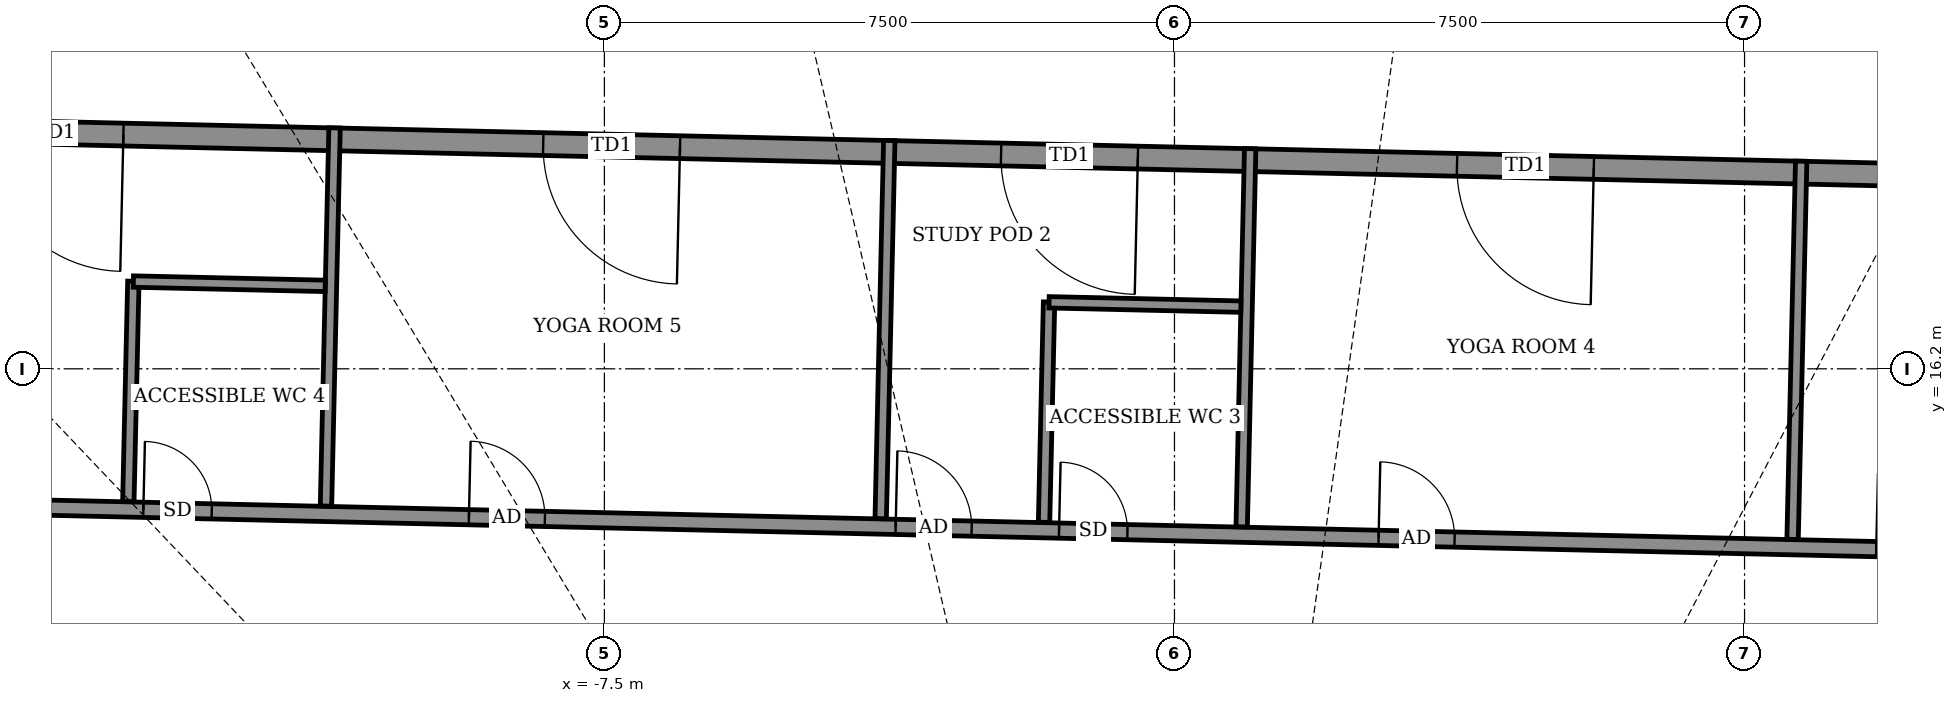
"""IFC4 building model, lengths in metres.
Left out: names, types, materials, properties, quantities, classifications, styles, units other than length and angle.
Written with IfcOpenShell. Run it as: python <this file> out.ifc"""

import sys

from ifc_helpers import new_model, si_unit, direction, frame, frame_2d, origin, place, context, subcontext, project, spatial, rectangle, extrude, element, fill, save


model = new_model("IFC4")
c1 = context("Model", 3, precision=1e-05, world=origin(), true_north=direction((0.0, 1.0)))
c2 = subcontext(c1, "Body", "Model", "MODEL_VIEW")
j1 = project(units=[si_unit("LENGTHUNIT", "METRE"), si_unit("PLANEANGLEUNIT", "RADIAN")], contexts=[c1])
p1 = place(None, origin())
s1 = spatial("IfcSite", under=j1, at=p1, CompositionType="ELEMENT")
p2 = place(p1, origin())
s2 = spatial("IfcBuilding", under=s1, at=p2, CompositionType="ELEMENT")
p3 = place(p2, frame((0.0, 0.0, 346.1)))
s3 = spatial("IfcBuildingStorey", under=s2, at=p3, CompositionType="ELEMENT", Elevation=346.1)
p4 = place(p3, frame((23.537, 18.434, 0.0), z_axis=(0.0, 0.0, 1.0), x_axis=(-0.999742787513, 0.022679480066, 0.0)))
e1 = element("IfcWall", 1, at=p4, inside=s3, PredefinedType="SOLIDWALL", context=c2, shape_type="SweptSolid", body=[
    extrude(rectangle(XDim=41.8, YDim=0.3, at=frame_2d((20.9, 0.0))), origin(), (0.0, 0.0, 1.0), 2.65),
])
p5 = place(p4, frame((3.0, 0.0, 0.0)))
e2 = element("IfcOpeningElement", 2, at=p5, cuts=e1, PredefinedType="OPENING", context=c2, shape_type="SweptSolid", body=[
    extrude(rectangle(XDim=1.8, YDim=2.4, at=frame_2d((0.9, 1.2))), frame((0.0, 0.16, 0.0), z_axis=(0.0, -1.0, 0.0), x_axis=(1.0, 0.0, 0.0)), (0.0, 0.0, 1.0), 0.32),
])
p6 = place(p4, frame((10.325, 0.0, 0.0)))
e3 = element("IfcOpeningElement", 3, at=p6, cuts=e1, PredefinedType="OPENING", context=c2, shape_type="SweptSolid", body=[
    extrude(rectangle(XDim=1.8, YDim=2.4, at=frame_2d((0.9, 1.2))), frame((0.0, 0.16, 0.0), z_axis=(0.0, -1.0, 0.0), x_axis=(1.0, 0.0, 0.0)), (0.0, 0.0, 1.0), 0.32),
])
p7 = place(p4, frame((18.025, 0.0, 0.0)))
e4 = element("IfcOpeningElement", 4, at=p7, cuts=e1, PredefinedType="OPENING", context=c2, shape_type="SweptSolid", body=[
    extrude(rectangle(XDim=1.8, YDim=2.4, at=frame_2d((0.9, 1.2))), frame((0.0, 0.16, 0.0), z_axis=(0.0, -1.0, 0.0), x_axis=(1.0, 0.0, 0.0)), (0.0, 0.0, 1.0), 0.32),
])
p8 = place(p4, frame((24.025, 0.0, 0.0)))
e5 = element("IfcOpeningElement", 5, at=p8, cuts=e1, PredefinedType="OPENING", context=c2, shape_type="SweptSolid", body=[
    extrude(rectangle(XDim=1.8, YDim=2.4, at=frame_2d((0.9, 1.2))), frame((0.0, 0.16, 0.0), z_axis=(0.0, -1.0, 0.0), x_axis=(1.0, 0.0, 0.0)), (0.0, 0.0, 1.0), 0.32),
])
p9 = place(p4, frame((30.05, 0.0, 0.0)))
e6 = element("IfcOpeningElement", 6, at=p9, cuts=e1, PredefinedType="OPENING", context=c2, shape_type="SweptSolid", body=[
    extrude(rectangle(XDim=1.8, YDim=2.4, at=frame_2d((0.9, 1.2))), frame((0.0, 0.16, 0.0), z_axis=(0.0, -1.0, 0.0), x_axis=(1.0, 0.0, 0.0)), (0.0, 0.0, 1.0), 0.32),
])
p10 = place(p4, frame((37.375, 0.0, 0.0)))
e7 = element("IfcOpeningElement", 7, at=p10, cuts=e1, PredefinedType="OPENING", context=c2, shape_type="SweptSolid", body=[
    extrude(rectangle(XDim=1.8, YDim=2.4, at=frame_2d((0.9, 1.2))), frame((0.0, 0.16, 0.0), z_axis=(0.0, -1.0, 0.0), x_axis=(1.0, 0.0, 0.0)), (0.0, 0.0, 1.0), 0.32),
])
p11 = place(p3, frame((-19.132, 14.471, 0.0), z_axis=(0.0, 0.0, 1.0), x_axis=(0.999742846934, -0.022676860534, 0.0)))
e8 = element("IfcWall", 8, at=p11, inside=s3, PredefinedType="PARTITIONING", context=c2, shape_type="SweptSolid", body=[
    extrude(rectangle(XDim=40.836, YDim=0.2, at=frame_2d((20.418, 0.0))), origin(), (0.0, 0.0, 1.0), 2.55),
])
p12 = place(p11, frame((37.108, 0.0, 0.0)))
e9 = element("IfcOpeningElement", 9, at=p12, cuts=e8, PredefinedType="OPENING", context=c2, shape_type="SweptSolid", body=[
    extrude(rectangle(XDim=1.0, YDim=2.1, at=frame_2d((0.5, 1.05))), frame((0.0, 0.11, 0.0), z_axis=(0.0, -1.0, 0.0), x_axis=(1.0, 0.0, 0.0)), (0.0, 0.0, 1.0), 0.22),
])
p13 = place(p11, frame((28.372, 0.0, 0.0)))
e10 = element("IfcOpeningElement", 10, at=p13, cuts=e8, PredefinedType="OPENING", context=c2, shape_type="SweptSolid", body=[
    extrude(rectangle(XDim=1.0, YDim=2.1, at=frame_2d((0.5, 1.05))), frame((0.0, 0.11, 0.0), z_axis=(0.0, -1.0, 0.0), x_axis=(1.0, 0.0, 0.0)), (0.0, 0.0, 1.0), 0.22),
])
p14 = place(p11, frame((33.218, 0.0, 0.0)))
e11 = element("IfcOpeningElement", 11, at=p14, cuts=e8, PredefinedType="OPENING", context=c2, shape_type="SweptSolid", body=[
    extrude(rectangle(XDim=0.9, YDim=2.1, at=frame_2d((0.45, 1.05))), frame((0.0, 0.11, 0.0), z_axis=(0.0, -1.0, 0.0), x_axis=(1.0, 0.0, 0.0)), (0.0, 0.0, 1.0), 0.22),
])
p15 = place(p11, frame((21.823, 0.0, 0.0)))
e12 = element("IfcOpeningElement", 12, at=p15, cuts=e8, PredefinedType="OPENING", context=c2, shape_type="SweptSolid", body=[
    extrude(rectangle(XDim=1.0, YDim=2.1, at=frame_2d((0.5, 1.05))), frame((0.0, 0.11, 0.0), z_axis=(0.0, -1.0, 0.0), x_axis=(1.0, 0.0, 0.0)), (0.0, 0.0, 1.0), 0.22),
])
p16 = place(p11, frame((15.468, 0.0, 0.0)))
e13 = element("IfcOpeningElement", 13, at=p16, cuts=e8, PredefinedType="OPENING", context=c2, shape_type="SweptSolid", body=[
    extrude(rectangle(XDim=1.0, YDim=2.1, at=frame_2d((0.5, 1.05))), frame((0.0, 0.11, 0.0), z_axis=(0.0, -1.0, 0.0), x_axis=(1.0, 0.0, 0.0)), (0.0, 0.0, 1.0), 0.22),
])
p17 = place(p11, frame((17.618, 0.0, 0.0)))
e14 = element("IfcOpeningElement", 14, at=p17, cuts=e8, PredefinedType="OPENING", context=c2, shape_type="SweptSolid", body=[
    extrude(rectangle(XDim=0.9, YDim=2.1, at=frame_2d((0.45, 1.05))), frame((0.0, 0.11, 0.0), z_axis=(0.0, -1.0, 0.0), x_axis=(1.0, 0.0, 0.0)), (0.0, 0.0, 1.0), 0.22),
])
p18 = place(p11, frame((9.852, 0.0, 0.0)))
e15 = element("IfcOpeningElement", 15, at=p18, cuts=e8, PredefinedType="OPENING", context=c2, shape_type="SweptSolid", body=[
    extrude(rectangle(XDim=1.0, YDim=2.1, at=frame_2d((0.5, 1.05))), frame((0.0, 0.11, 0.0), z_axis=(0.0, -1.0, 0.0), x_axis=(1.0, 0.0, 0.0)), (0.0, 0.0, 1.0), 0.22),
])
p19 = place(p11, frame((0.2, 0.0, 0.0)))
e16 = element("IfcOpeningElement", 16, at=p19, cuts=e8, PredefinedType="OPENING", context=c2, shape_type="SweptSolid", body=[
    extrude(rectangle(XDim=1.0, YDim=2.1, at=frame_2d((0.5, 1.05))), frame((0.0, 0.11, 0.0), z_axis=(0.0, -1.0, 0.0), x_axis=(1.0, 0.0, 0.0)), (0.0, 0.0, 1.0), 0.22),
])
p20 = place(p11, frame((5.568, 0.0, 0.0)))
e17 = element("IfcOpeningElement", 17, at=p20, cuts=e8, PredefinedType="OPENING", context=c2, shape_type="SweptSolid", body=[
    extrude(rectangle(XDim=0.9, YDim=2.1, at=frame_2d((0.45, 1.05))), frame((0.0, 0.11, 0.0), z_axis=(0.0, -1.0, 0.0), x_axis=(1.0, 0.0, 0.0)), (0.0, 0.0, 1.0), 0.22),
])
p21 = place(p3, frame((-13.763, 14.453, 0.0), z_axis=(0.0, 0.0, 1.0), x_axis=(0.022730967319, 0.999741618182, 0.0)))
e18 = element("IfcWall", 18, at=p21, inside=s3, PredefinedType="PARTITIONING", context=c2, shape_type="SweptSolid", body=[
    extrude(rectangle(XDim=2.9, YDim=0.15, at=frame_2d((1.45, 0.0))), origin(), (0.0, 0.0, 1.0), 2.65),
])
p22 = place(p3, frame((-11.163, 14.394, 0.0), z_axis=(0.0, 0.0, 1.0), x_axis=(0.022715832973, 0.999741962174, 0.0)))
e19 = element("IfcWall", 19, at=p22, inside=s3, PredefinedType="PARTITIONING", context=c2, shape_type="SweptSolid", body=[
    extrude(rectangle(XDim=4.976, YDim=0.15, at=frame_2d((2.488, 0.0))), origin(), (0.0, 0.0, 1.0), 2.85),
])
p23 = place(p3, frame((-3.865, 14.229, 0.0), z_axis=(0.0, 0.0, 1.0), x_axis=(0.022720290659, 0.999741860878, 0.0)))
e20 = element("IfcWall", 20, at=p23, inside=s3, PredefinedType="PARTITIONING", context=c2, shape_type="SweptSolid", body=[
    extrude(rectangle(XDim=4.975, YDim=0.15, at=frame_2d((2.488, 0.0))), origin(), (0.0, 0.0, 1.0), 2.85),
])
p24 = place(p3, frame((-1.716, 14.18, 0.0), z_axis=(0.0, 0.0, 1.0), x_axis=(0.022815112345, 0.999739701447, 0.0)))
e21 = element("IfcWall", 21, at=p24, inside=s3, PredefinedType="PARTITIONING", context=c2, shape_type="SweptSolid", body=[
    extrude(rectangle(XDim=2.9, YDim=0.15, at=frame_2d((1.45, 0.0))), origin(), (0.0, 0.0, 1.0), 4.05),
])
p25 = place(p3, frame((0.884, 14.121, 0.0), z_axis=(0.0, 0.0, 1.0), x_axis=(0.022519683834, 0.999746399763, 0.0)))
e22 = element("IfcWall", 22, at=p25, inside=s3, PredefinedType="PARTITIONING", context=c2, shape_type="SweptSolid", body=[
    extrude(rectangle(XDim=4.976, YDim=0.15, at=frame_2d((2.488, 0.0))), origin(), (0.0, 0.0, 1.0), 4.05),
])
p26 = place(p3, frame((8.132, 13.956, 0.0), z_axis=(0.0, 0.0, 1.0), x_axis=(0.022715832973, 0.999741962174, 0.0)))
e23 = element("IfcWall", 23, at=p26, inside=s3, PredefinedType="PARTITIONING", context=c2, shape_type="SweptSolid", body=[
    extrude(rectangle(XDim=4.976, YDim=0.15, at=frame_2d((2.488, 0.0))), origin(), (0.0, 0.0, 1.0), 2.85),
])
p27 = place(p3, frame((-13.697, 17.348, 0.0), z_axis=(0.0, 0.0, 1.0), x_axis=(0.9997461113, -0.022532486354, 0.0)))
e24 = element("IfcWall", 24, at=p27, inside=s3, PredefinedType="PARTITIONING", context=c2, shape_type="SweptSolid", body=[
    extrude(rectangle(XDim=2.525, YDim=0.15, at=frame_2d((1.262, 0.0))), origin(), (0.0, 0.0, 1.0), 2.85),
])
p28 = place(p3, frame((-1.65, 17.075, 0.0), z_axis=(0.0, 0.0, 1.0), x_axis=(0.9997461113, -0.022532486354, 0.0)))
e25 = element("IfcWall", 25, at=p28, inside=s3, PredefinedType="PARTITIONING", context=c2, shape_type="SweptSolid", body=[
    extrude(rectangle(XDim=2.525, YDim=0.15, at=frame_2d((1.262, 0.0))), origin(), (0.0, 0.0, 1.0), 4.05),
])
p29 = place(p7, origin())
e26 = element("IfcDoor", 26, at=p29, inside=s3, OperationType="DOUBLE_DOOR_SINGLE_SWING", PredefinedType="DOOR", context=c2, shape_type="SweptSolid", body=[
    extrude(rectangle(XDim=1.8, YDim=2.4, at=frame_2d((0.9, 1.2))), frame((0.0, 0.025, 0.0), z_axis=(0.0, -1.0, 0.0), x_axis=(1.0, 0.0, 0.0)), (0.0, 0.0, 1.0), 0.05),
])
fill(e4, e26)
p30 = place(p8, origin())
e27 = element("IfcDoor", 27, at=p30, inside=s3, OperationType="DOUBLE_DOOR_SINGLE_SWING", PredefinedType="DOOR", context=c2, shape_type="SweptSolid", body=[
    extrude(rectangle(XDim=1.8, YDim=2.4, at=frame_2d((0.9, 1.2))), frame((0.0, 0.025, 0.0), z_axis=(0.0, -1.0, 0.0), x_axis=(1.0, 0.0, 0.0)), (0.0, 0.0, 1.0), 0.05),
])
fill(e5, e27)
p31 = place(p9, origin())
e28 = element("IfcDoor", 28, at=p31, inside=s3, OperationType="DOUBLE_DOOR_SINGLE_SWING", PredefinedType="DOOR", context=c2, shape_type="SweptSolid", body=[
    extrude(rectangle(XDim=1.8, YDim=2.4, at=frame_2d((0.9, 1.2))), frame((0.0, 0.025, 0.0), z_axis=(0.0, -1.0, 0.0), x_axis=(1.0, 0.0, 0.0)), (0.0, 0.0, 1.0), 0.05),
])
fill(e6, e28)
p32 = place(p10, origin())
e29 = element("IfcDoor", 29, at=p32, inside=s3, OperationType="DOUBLE_DOOR_SINGLE_SWING", PredefinedType="DOOR", context=c2, shape_type="SweptSolid", body=[
    extrude(rectangle(XDim=1.8, YDim=2.4, at=frame_2d((0.9, 1.2))), frame((0.0, 0.025, 0.0), z_axis=(0.0, -1.0, 0.0), x_axis=(1.0, 0.0, 0.0)), (0.0, 0.0, 1.0), 0.05),
])
fill(e7, e29)
p33 = place(p13, origin())
e30 = element("IfcDoor", 30, at=p33, inside=s3, OperationType="SINGLE_SWING_RIGHT", PredefinedType="DOOR", context=c2, shape_type="SweptSolid", body=[
    extrude(rectangle(XDim=1.0, YDim=2.1, at=frame_2d((0.5, 1.05))), frame((0.0, 0.025, 0.0), z_axis=(0.0, -1.0, 0.0), x_axis=(1.0, 0.0, 0.0)), (0.0, 0.0, 1.0), 0.05),
])
fill(e10, e30)
p34 = place(p15, origin())
e31 = element("IfcDoor", 31, at=p34, inside=s3, OperationType="SINGLE_SWING_LEFT", PredefinedType="DOOR", context=c2, shape_type="SweptSolid", body=[
    extrude(rectangle(XDim=1.0, YDim=2.1, at=frame_2d((0.5, 1.05))), frame((0.0, 0.025, 0.0), z_axis=(0.0, -1.0, 0.0), x_axis=(1.0, 0.0, 0.0)), (0.0, 0.0, 1.0), 0.05),
])
fill(e12, e31)
p35 = place(p16, origin())
e32 = element("IfcDoor", 32, at=p35, inside=s3, OperationType="SINGLE_SWING_RIGHT", PredefinedType="DOOR", context=c2, shape_type="SweptSolid", body=[
    extrude(rectangle(XDim=1.0, YDim=2.1, at=frame_2d((0.5, 1.05))), frame((0.0, 0.025, 0.0), z_axis=(0.0, -1.0, 0.0), x_axis=(1.0, 0.0, 0.0)), (0.0, 0.0, 1.0), 0.05),
])
fill(e13, e32)
p36 = place(p17, origin())
e33 = element("IfcDoor", 33, at=p36, inside=s3, OperationType="SINGLE_SWING_RIGHT", PredefinedType="DOOR", context=c2, shape_type="SweptSolid", body=[
    extrude(rectangle(XDim=0.9, YDim=2.1, at=frame_2d((0.45, 1.05))), frame((0.0, 0.025, 0.0), z_axis=(0.0, -1.0, 0.0), x_axis=(1.0, 0.0, 0.0)), (0.0, 0.0, 1.0), 0.05),
])
fill(e14, e33)
p37 = place(p18, origin())
e34 = element("IfcDoor", 34, at=p37, inside=s3, OperationType="SINGLE_SWING_LEFT", PredefinedType="DOOR", context=c2, shape_type="SweptSolid", body=[
    extrude(rectangle(XDim=1.0, YDim=2.1, at=frame_2d((0.5, 1.05))), frame((0.0, 0.025, 0.0), z_axis=(0.0, -1.0, 0.0), x_axis=(1.0, 0.0, 0.0)), (0.0, 0.0, 1.0), 0.05),
])
fill(e15, e34)
p38 = place(p20, origin())
e35 = element("IfcDoor", 35, at=p38, inside=s3, OperationType="SINGLE_SWING_LEFT", PredefinedType="DOOR", context=c2, shape_type="SweptSolid", body=[
    extrude(rectangle(XDim=0.9, YDim=2.1, at=frame_2d((0.45, 1.05))), frame((0.0, 0.025, 0.0), z_axis=(0.0, -1.0, 0.0), x_axis=(1.0, 0.0, 0.0)), (0.0, 0.0, 1.0), 0.05),
])
fill(e17, e35)
save(model, sys.argv[1])
